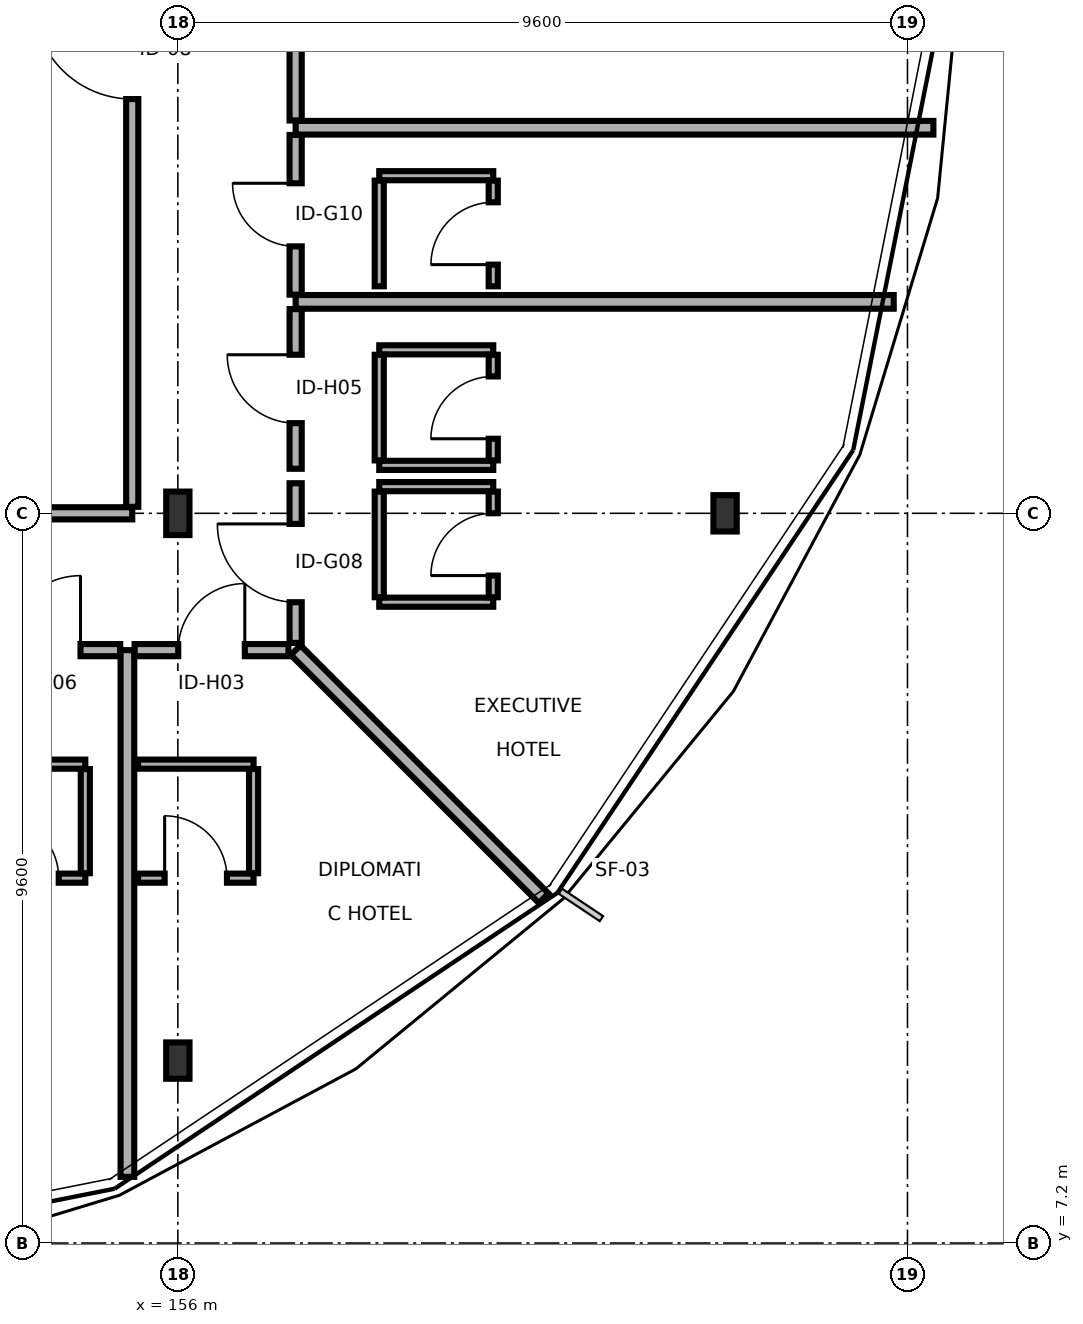
"""IFC4 building model, lengths in metres.
Left out: names, types, materials, properties, quantities, classifications, styles, units other than length and angle.
Written with IfcOpenShell. Run it as: python <this file> out.ifc"""

import sys

from ifc_helpers import new_model, si_unit, direction, frame, frame_2d, origin, origin_2d, place, context, subcontext, project, spatial, rectangle, i_section, extrude, element, fill, save


model = new_model("IFC4")
c1 = context("Model", 3, precision=1e-05, world=origin(), true_north=direction((0.0, 1.0)))
c2 = subcontext(c1, "Body", "Model", "MODEL_VIEW")
j1 = project(units=[si_unit("LENGTHUNIT", "METRE"), si_unit("PLANEANGLEUNIT", "RADIAN")], contexts=[c1])
p1 = place(None, origin())
s1 = spatial("IfcSite", under=j1, at=p1, CompositionType="ELEMENT")
p2 = place(p1, origin())
s2 = spatial("IfcBuilding", under=s1, at=p2, CompositionType="ELEMENT")
p3 = place(p2, frame((0.0, 0.0, 18.1)))
s3 = spatial("IfcBuildingStorey", under=s2, at=p3, CompositionType="ELEMENT", Elevation=18.1)
p4 = place(p3, frame((156.0, 16.8, 0.0), z_axis=(0.0, 0.0, 1.0), x_axis=(1.0, 0.0, 0.0)))
e1 = element("IfcColumn", 1, at=p4, inside=s3, PredefinedType="COLUMN", context=c2, shape_type="SweptSolid", body=[
    extrude(i_section(OverallWidth=0.306, OverallDepth=0.572, WebThickness=0.021, FlangeThickness=0.04, FilletRadius=0.027, at=origin_2d()), origin(), (0.0, 0.0, 1.0), 3.4),
])
for number, where, z_axis, x_axis in (
    (2, (156.0, 9.6, 0.0), (0.0, 0.0, 1.0), (1.0, 0.0, 0.0)),
    (3, (163.2, 16.8, 0.0), (0.0, 0.0, 1.0), (1.0, 0.0, 0.0)),
):
    element("IfcColumn", number, at=place(p3, frame(where, z_axis=z_axis, x_axis=x_axis)), inside=s3, PredefinedType="COLUMN", context=c2, shape_type="SweptSolid", body=[
        extrude(i_section(OverallWidth=0.307, OverallDepth=0.478, WebThickness=0.021, FlangeThickness=0.04, FilletRadius=0.027, at=origin_2d()), origin(), (0.0, 0.0, 1.0), 3.4),
    ])
p5 = place(p3, frame((153.6, 16.8, 0.0), z_axis=(0.0, 0.0, 1.0), x_axis=(1.0, 0.0, 0.0)))
e4 = element("IfcWall", 4, at=p5, inside=s3, PredefinedType="PARTITIONING", context=c2, shape_type="SweptSolid", body=[
    extrude(rectangle(XDim=1.8, YDim=0.16, at=frame_2d((0.9, 0.0))), origin(), (0.0, 0.0, 1.0), 2.745),
])
p6 = place(p3, frame((155.4, 16.885, 0.0), z_axis=(0.0, 0.0, 1.0), x_axis=(0.0, 1.0, 0.0)))
e5 = element("IfcWall", 5, at=p6, inside=s3, PredefinedType="PARTITIONING", context=c2, shape_type="SweptSolid", body=[
    extrude(rectangle(XDim=12.03, YDim=0.16, at=frame_2d((6.015, 0.0))), origin(), (0.0, 0.0, 1.0), 2.745),
])
p7 = place(p6, frame((5.365, 0.0, 0.0)))
e6 = element("IfcOpeningElement", 6, at=p7, cuts=e5, PredefinedType="OPENING", context=c2, shape_type="SweptSolid", body=[
    extrude(rectangle(XDim=1.3, YDim=2.2, at=frame_2d((0.65, 1.1))), frame((0.0, 0.09, 0.0), z_axis=(0.0, -1.0, 0.0), x_axis=(1.0, 0.0, 0.0)), (0.0, 0.0, 1.0), 0.18),
])
p8 = place(p3, frame((157.55, 21.968, 0.0), z_axis=(0.0, 0.0, 1.0), x_axis=(0.0, 1.0, 0.0)))
e7 = element("IfcWall", 7, at=p8, inside=s3, PredefinedType="PARTITIONING", context=c2, shape_type="SweptSolid", body=[
    extrude(rectangle(XDim=6.683, YDim=0.16, at=frame_2d((3.341, 0.0))), origin(), (0.0, 0.0, 1.0), 2.745),
])
p9 = place(p8, frame((2.591, 0.0, 0.0)))
e8 = element("IfcOpeningElement", 8, at=p9, cuts=e7, PredefinedType="OPENING", context=c2, shape_type="SweptSolid", body=[
    extrude(rectangle(XDim=1.5, YDim=2.25, at=frame_2d((0.75, 1.125))), frame((0.0, 0.09, 0.0), z_axis=(0.0, -1.0, 0.0), x_axis=(1.0, 0.0, 0.0)), (0.0, 0.0, 1.0), 0.18),
])
p10 = place(p3, frame((153.218, 15.0, 0.0), z_axis=(0.0, 0.0, 1.0), x_axis=(1.0, 0.0, 0.0)))
e9 = element("IfcWall", 9, at=p10, inside=s3, PredefinedType="PARTITIONING", context=c2, shape_type="SweptSolid", body=[
    extrude(rectangle(XDim=2.024, YDim=0.16, at=frame_2d((1.012, 0.0))), origin(), (0.0, 0.0, 1.0), 3.21),
])
p11 = place(p10, frame((0.522, 0.0, 0.0)))
e10 = element("IfcOpeningElement", 10, at=p11, cuts=e9, PredefinedType="OPENING", context=c2, shape_type="SweptSolid", body=[
    extrude(rectangle(XDim=0.98, YDim=2.05, at=frame_2d((0.49, 1.025))), frame((0.0, 0.09, 0.0), z_axis=(0.0, -1.0, 0.0), x_axis=(1.0, 0.0, 0.0)), (0.0, 0.0, 1.0), 0.18),
])
p12 = place(p3, frame((153.263, 12.0, 0.0), z_axis=(0.0, 0.0, 1.0), x_axis=(1.0, 0.0, 0.0)))
e11 = element("IfcWall", 11, at=p12, inside=s3, PredefinedType="PARTITIONING", context=c2, shape_type="SweptSolid", body=[
    extrude(rectangle(XDim=1.52, YDim=0.12, at=frame_2d((0.76, 0.0))), origin(), (0.0, 0.0, 1.0), 3.21),
])
p13 = place(p12, frame((0.35, 0.0, 0.0)))
e12 = element("IfcOpeningElement", 12, at=p13, cuts=e11, PredefinedType="OPENING", context=c2, shape_type="SweptSolid", body=[
    extrude(rectangle(XDim=0.82, YDim=2.08, at=frame_2d((0.41, 1.04))), frame((0.0, 0.07, 0.0), z_axis=(0.0, -1.0, 0.0), x_axis=(1.0, 0.0, 0.0)), (0.0, 0.0, 1.0), 0.14),
])
p14 = place(p3, frame((153.263, 13.5, 0.0), z_axis=(0.0, 0.0, 1.0), x_axis=(1.0, 0.0, 0.0)))
e13 = element("IfcWall", 13, at=p14, inside=s3, PredefinedType="PARTITIONING", context=c2, shape_type="SweptSolid", body=[
    extrude(rectangle(XDim=1.52, YDim=0.12, at=frame_2d((0.76, 0.0))), origin(), (0.0, 0.0, 1.0), 3.21),
])
p15 = place(p3, frame((154.783, 12.065, 0.0), z_axis=(0.0, 0.0, 1.0), x_axis=(0.0, 1.0, 0.0)))
e14 = element("IfcWall", 14, at=p15, inside=s3, PredefinedType="PARTITIONING", context=c2, shape_type="SweptSolid", body=[
    extrude(rectangle(XDim=1.37, YDim=0.12, at=frame_2d((0.685, 0.0))), origin(), (0.0, 0.0, 1.0), 3.21),
])
p16 = place(p3, frame((155.336, 8.071, 0.0), z_axis=(0.0, 0.0, 1.0), x_axis=(0.0, 1.0, 0.0)))
e15 = element("IfcWall", 15, at=p16, inside=s3, PredefinedType="PARTITIONING", context=c2, shape_type="SweptSolid", body=[
    extrude(rectangle(XDim=6.929, YDim=0.18, at=frame_2d((3.465, 0.0))), origin(), (0.0, 0.0, 1.0), 2.755),
])
p17 = place(p3, frame((155.431, 15.0, 0.0), z_axis=(0.0, 0.0, 1.0), x_axis=(1.0, 0.0, 0.0)))
e16 = element("IfcWall", 16, at=p17, inside=s3, PredefinedType="PARTITIONING", context=c2, shape_type="SweptSolid", body=[
    extrude(rectangle(XDim=2.024, YDim=0.16, at=frame_2d((1.012, 0.0))), origin(), (0.0, 0.0, 1.0), 2.745),
])
p18 = place(p17, frame((0.574, 0.0, 0.0)))
e17 = element("IfcOpeningElement", 17, at=p18, cuts=e16, PredefinedType="OPENING", context=c2, shape_type="SweptSolid", body=[
    extrude(rectangle(XDim=0.876, YDim=2.16, at=frame_2d((0.438, 1.08))), frame((0.0, 0.09, 0.0), z_axis=(0.0, -1.0, 0.0), x_axis=(1.0, 0.0, 0.0)), (0.0, 0.0, 1.0), 0.18),
])
p19 = place(p3, frame((155.476, 12.0, 0.0), z_axis=(0.0, 0.0, 1.0), x_axis=(1.0, 0.0, 0.0)))
e18 = element("IfcWall", 18, at=p19, inside=s3, PredefinedType="PARTITIONING", context=c2, shape_type="SweptSolid", body=[
    extrude(rectangle(XDim=1.52, YDim=0.12, at=frame_2d((0.76, 0.0))), origin(), (0.0, 0.0, 1.0), 2.745),
])
p20 = place(p19, frame((0.35, 0.0, 0.0)))
e19 = element("IfcOpeningElement", 19, at=p20, cuts=e18, PredefinedType="OPENING", context=c2, shape_type="SweptSolid", body=[
    extrude(rectangle(XDim=0.82, YDim=2.08, at=frame_2d((0.41, 1.04))), frame((0.0, 0.07, 0.0), z_axis=(0.0, -1.0, 0.0), x_axis=(1.0, 0.0, 0.0)), (0.0, 0.0, 1.0), 0.14),
])
p21 = place(p3, frame((155.476, 13.5, 0.0), z_axis=(0.0, 0.0, 1.0), x_axis=(1.0, 0.0, 0.0)))
e20 = element("IfcWall", 20, at=p21, inside=s3, PredefinedType="PARTITIONING", context=c2, shape_type="SweptSolid", body=[
    extrude(rectangle(XDim=1.52, YDim=0.12, at=frame_2d((0.76, 0.0))), origin(), (0.0, 0.0, 1.0), 2.745),
])
p22 = place(p3, frame((156.996, 12.065, 0.0), z_axis=(0.0, 0.0, 1.0), x_axis=(0.0, 1.0, 0.0)))
e21 = element("IfcWall", 21, at=p22, inside=s3, PredefinedType="PARTITIONING", context=c2, shape_type="SweptSolid", body=[
    extrude(rectangle(XDim=1.37, YDim=0.12, at=frame_2d((0.685, 0.0))), origin(), (0.0, 0.0, 1.0), 3.21),
])
p23 = place(p3, frame((157.55, 15.0, 0.0), z_axis=(0.0, 0.0, 1.0), x_axis=(0.707106781187, -0.707106781187, 0.0)))
e22 = element("IfcWall", 22, at=p23, inside=s3, PredefinedType="PARTITIONING", context=c2, shape_type="SweptSolid", body=[
    extrude(rectangle(XDim=4.615, YDim=0.18, at=frame_2d((2.308, 0.0))), origin(), (0.0, 0.0, 1.0), 2.755),
])
p24 = place(p3, frame((157.55, 15.095, 0.0), z_axis=(0.0, 0.0, 1.0), x_axis=(0.0, 1.0, 0.0)))
e23 = element("IfcWall", 23, at=p24, inside=s3, PredefinedType="PARTITIONING", context=c2, shape_type="SweptSolid", body=[
    extrude(rectangle(XDim=2.101, YDim=0.16, at=frame_2d((1.05, 0.0))), origin(), (0.0, 0.0, 1.0), 2.745),
])
p25 = place(p24, frame((0.535, 0.0, 0.0)))
e24 = element("IfcOpeningElement", 24, at=p25, cuts=e23, PredefinedType="OPENING", context=c2, shape_type="SweptSolid", body=[
    extrude(rectangle(XDim=1.03, YDim=2.05, at=frame_2d((0.515, 1.025))), frame((0.0, 0.09, 0.0), z_axis=(0.0, -1.0, 0.0), x_axis=(1.0, 0.0, 0.0)), (0.0, 0.0, 1.0), 0.18),
])
for number, where, z_axis, x_axis in (
    (25, (158.65, 15.631, 0.0), (0.0, 0.0, 1.0), (1.0, 0.0, 0.0)),
    (26, (158.65, 17.151, 0.0), (0.0, 0.0, 1.0), (1.0, 0.0, 0.0)),
):
    element("IfcWall", number, at=place(p3, frame(where, z_axis=z_axis, x_axis=x_axis)), inside=s3, PredefinedType="PARTITIONING", context=c2, shape_type="SweptSolid", body=[
        extrude(rectangle(XDim=1.5, YDim=0.12, at=frame_2d((0.75, 0.0))), origin(), (0.0, 0.0, 1.0), 3.21),
    ])
p26 = place(p3, frame((158.65, 15.696, 0.0), z_axis=(0.0, 0.0, 1.0), x_axis=(0.0, 1.0, 0.0)))
e27 = element("IfcWall", 27, at=p26, inside=s3, PredefinedType="PARTITIONING", context=c2, shape_type="SweptSolid", body=[
    extrude(rectangle(XDim=1.39, YDim=0.12, at=frame_2d((0.695, 0.0))), origin(), (0.0, 0.0, 1.0), 2.745),
])
p27 = place(p3, frame((160.15, 15.696, 0.0), z_axis=(0.0, 0.0, 1.0), x_axis=(0.0, 1.0, 0.0)))
e28 = element("IfcWall", 28, at=p27, inside=s3, PredefinedType="PARTITIONING", context=c2, shape_type="SweptSolid", body=[
    extrude(rectangle(XDim=1.39, YDim=0.12, at=frame_2d((0.695, 0.0))), origin(), (0.0, 0.0, 1.0), 2.745),
])
p28 = place(p27, frame((0.285, 0.0, 0.0)))
e29 = element("IfcOpeningElement", 29, at=p28, cuts=e28, PredefinedType="OPENING", context=c2, shape_type="SweptSolid", body=[
    extrude(rectangle(XDim=0.82, YDim=2.08, at=frame_2d((0.41, 1.04))), frame((0.0, 0.07, 0.0), z_axis=(0.0, -1.0, 0.0), x_axis=(1.0, 0.0, 0.0)), (0.0, 0.0, 1.0), 0.14),
])
p29 = place(p3, frame((157.55, 17.386, 0.0), z_axis=(0.0, 0.0, 1.0), x_axis=(0.0, 1.0, 0.0)))
e30 = element("IfcWall", 30, at=p29, inside=s3, PredefinedType="PARTITIONING", context=c2, shape_type="SweptSolid", body=[
    extrude(rectangle(XDim=2.101, YDim=0.16, at=frame_2d((1.05, 0.0))), origin(), (0.0, 0.0, 1.0), 3.21),
])
p30 = place(p29, frame((0.6, 0.0, 0.0)))
e31 = element("IfcOpeningElement", 31, at=p30, cuts=e30, PredefinedType="OPENING", context=c2, shape_type="SweptSolid", body=[
    extrude(rectangle(XDim=0.9, YDim=2.1, at=frame_2d((0.45, 1.05))), frame((0.0, 0.09, 0.0), z_axis=(0.0, -1.0, 0.0), x_axis=(1.0, 0.0, 0.0)), (0.0, 0.0, 1.0), 0.18),
])
for number, where, z_axis, x_axis in (
    (32, (158.65, 17.431, 0.0), (0.0, 0.0, 1.0), (1.0, 0.0, 0.0)),
    (33, (158.65, 18.951, 0.0), (0.0, 0.0, 1.0), (1.0, 0.0, 0.0)),
):
    element("IfcWall", number, at=place(p3, frame(where, z_axis=z_axis, x_axis=x_axis)), inside=s3, PredefinedType="PARTITIONING", context=c2, shape_type="SweptSolid", body=[
        extrude(rectangle(XDim=1.5, YDim=0.12, at=frame_2d((0.75, 0.0))), origin(), (0.0, 0.0, 1.0), 3.21),
    ])
p31 = place(p3, frame((158.65, 17.496, 0.0), z_axis=(0.0, 0.0, 1.0), x_axis=(0.0, 1.0, 0.0)))
e34 = element("IfcWall", 34, at=p31, inside=s3, PredefinedType="PARTITIONING", context=c2, shape_type="SweptSolid", body=[
    extrude(rectangle(XDim=1.39, YDim=0.12, at=frame_2d((0.695, 0.0))), origin(), (0.0, 0.0, 1.0), 3.21),
])
p32 = place(p3, frame((160.15, 17.496, 0.0), z_axis=(0.0, 0.0, 1.0), x_axis=(0.0, 1.0, 0.0)))
e35 = element("IfcWall", 35, at=p32, inside=s3, PredefinedType="PARTITIONING", context=c2, shape_type="SweptSolid", body=[
    extrude(rectangle(XDim=1.39, YDim=0.12, at=frame_2d((0.695, 0.0))), origin(), (0.0, 0.0, 1.0), 3.21),
])
p33 = place(p32, frame((0.285, 0.0, 0.0)))
e36 = element("IfcOpeningElement", 36, at=p33, cuts=e35, PredefinedType="OPENING", context=c2, shape_type="SweptSolid", body=[
    extrude(rectangle(XDim=0.82, YDim=2.08, at=frame_2d((0.41, 1.04))), frame((0.0, 0.07, 0.0), z_axis=(0.0, -1.0, 0.0), x_axis=(1.0, 0.0, 0.0)), (0.0, 0.0, 1.0), 0.14),
])
p34 = place(p3, frame((157.55, 19.582, 0.0), z_axis=(0.0, 0.0, 1.0), x_axis=(1.0, 0.0, 0.0)))
e37 = element("IfcWall", 37, at=p34, inside=s3, PredefinedType="PARTITIONING", context=c2, shape_type="SweptSolid", body=[
    extrude(rectangle(XDim=7.869, YDim=0.18, at=frame_2d((3.934, 0.0))), origin(), (0.0, 0.0, 1.0), 2.755),
])
p35 = place(p3, frame((157.55, 19.677, 0.0), z_axis=(0.0, 0.0, 1.0), x_axis=(0.0, 1.0, 0.0)))
e38 = element("IfcWall", 38, at=p35, inside=s3, PredefinedType="PARTITIONING", context=c2, shape_type="SweptSolid", body=[
    extrude(rectangle(XDim=2.101, YDim=0.16, at=frame_2d((1.05, 0.0))), origin(), (0.0, 0.0, 1.0), 3.21),
])
p36 = place(p35, frame((0.635, 0.0, 0.0)))
e39 = element("IfcOpeningElement", 39, at=p36, cuts=e38, PredefinedType="OPENING", context=c2, shape_type="SweptSolid", body=[
    extrude(rectangle(XDim=0.83, YDim=2.11, at=frame_2d((0.415, 1.055))), frame((0.0, 0.09, 0.0), z_axis=(0.0, -1.0, 0.0), x_axis=(1.0, 0.0, 0.0)), (0.0, 0.0, 1.0), 0.18),
])
p37 = place(p3, frame((158.65, 21.242, 0.0), z_axis=(0.0, 0.0, 1.0), x_axis=(1.0, 0.0, 0.0)))
e40 = element("IfcWall", 40, at=p37, inside=s3, PredefinedType="PARTITIONING", context=c2, shape_type="SweptSolid", body=[
    extrude(rectangle(XDim=1.5, YDim=0.12, at=frame_2d((0.75, 0.0))), origin(), (0.0, 0.0, 1.0), 3.21),
])
p38 = place(p3, frame((158.65, 19.787, 0.0), z_axis=(0.0, 0.0, 1.0), x_axis=(0.0, 1.0, 0.0)))
e41 = element("IfcWall", 41, at=p38, inside=s3, PredefinedType="PARTITIONING", context=c2, shape_type="SweptSolid", body=[
    extrude(rectangle(XDim=1.39, YDim=0.12, at=frame_2d((0.695, 0.0))), origin(), (0.0, 0.0, 1.0), 3.21),
])
p39 = place(p3, frame((160.15, 19.787, 0.0), z_axis=(0.0, 0.0, 1.0), x_axis=(0.0, 1.0, 0.0)))
e42 = element("IfcWall", 42, at=p39, inside=s3, PredefinedType="PARTITIONING", context=c2, shape_type="SweptSolid", body=[
    extrude(rectangle(XDim=1.39, YDim=0.12, at=frame_2d((0.695, 0.0))), origin(), (0.0, 0.0, 1.0), 3.21),
])
p40 = place(p39, frame((0.285, 0.0, 0.0)))
e43 = element("IfcOpeningElement", 43, at=p40, cuts=e42, PredefinedType="OPENING", context=c2, shape_type="SweptSolid", body=[
    extrude(rectangle(XDim=0.82, YDim=2.08, at=frame_2d((0.41, 1.04))), frame((0.0, 0.07, 0.0), z_axis=(0.0, -1.0, 0.0), x_axis=(1.0, 0.0, 0.0)), (0.0, 0.0, 1.0), 0.14),
])
p41 = place(p3, frame((157.55, 21.873, 0.0), z_axis=(0.0, 0.0, 1.0), x_axis=(1.0, 0.0, 0.0)))
e44 = element("IfcWall", 44, at=p41, inside=s3, PredefinedType="PARTITIONING", context=c2, shape_type="SweptSolid", body=[
    extrude(rectangle(XDim=8.391, YDim=0.18, at=frame_2d((4.195, 0.0))), origin(), (0.0, 0.0, 1.0), 2.755),
])
p42 = place(p7, origin())
e45 = element("IfcDoor", 45, at=p42, inside=s3, OperationType="SINGLE_SWING_RIGHT", PredefinedType="DOOR", context=c2, shape_type="SweptSolid", body=[
    extrude(rectangle(XDim=1.3, YDim=2.2, at=frame_2d((0.65, 1.1))), frame((0.0, 0.025, 0.0), z_axis=(0.0, -1.0, 0.0), x_axis=(1.0, 0.0, 0.0)), (0.0, 0.0, 1.0), 0.05),
])
fill(e6, e45)
p43 = place(p11, origin())
e46 = element("IfcDoor", 46, at=p43, inside=s3, OperationType="SINGLE_SWING_RIGHT", PredefinedType="DOOR", context=c2, shape_type="SweptSolid", body=[
    extrude(rectangle(XDim=0.98, YDim=2.05, at=frame_2d((0.49, 1.025))), frame((0.0, 0.025, 0.0), z_axis=(0.0, -1.0, 0.0), x_axis=(1.0, 0.0, 0.0)), (0.0, 0.0, 1.0), 0.05),
])
fill(e10, e46)
p44 = place(p13, origin())
e47 = element("IfcDoor", 47, at=p44, inside=s3, OperationType="SINGLE_SWING_LEFT", PredefinedType="DOOR", context=c2, shape_type="SweptSolid", body=[
    extrude(rectangle(XDim=0.82, YDim=2.08, at=frame_2d((0.41, 1.04))), frame((0.0, 0.025, 0.0), z_axis=(0.0, -1.0, 0.0), x_axis=(1.0, 0.0, 0.0)), (0.0, 0.0, 1.0), 0.05),
])
fill(e12, e47)
p45 = place(p18, origin())
e48 = element("IfcDoor", 48, at=p45, inside=s3, OperationType="SINGLE_SWING_RIGHT", PredefinedType="DOOR", context=c2, shape_type="SweptSolid", body=[
    extrude(rectangle(XDim=0.876, YDim=2.16, at=frame_2d((0.438, 1.08))), frame((0.0, 0.025, 0.0), z_axis=(0.0, -1.0, 0.0), x_axis=(1.0, 0.0, 0.0)), (0.0, 0.0, 1.0), 0.05),
])
fill(e17, e48)
p46 = place(p20, origin())
e49 = element("IfcDoor", 49, at=p46, inside=s3, OperationType="SINGLE_SWING_LEFT", PredefinedType="DOOR", context=c2, shape_type="SweptSolid", body=[
    extrude(rectangle(XDim=0.82, YDim=2.08, at=frame_2d((0.41, 1.04))), frame((0.0, 0.025, 0.0), z_axis=(0.0, -1.0, 0.0), x_axis=(1.0, 0.0, 0.0)), (0.0, 0.0, 1.0), 0.05),
])
fill(e19, e49)
p47 = place(p25, origin())
e50 = element("IfcDoor", 50, at=p47, inside=s3, OperationType="SINGLE_SWING_RIGHT", PredefinedType="DOOR", context=c2, shape_type="SweptSolid", body=[
    extrude(rectangle(XDim=1.03, YDim=2.05, at=frame_2d((0.515, 1.025))), frame((0.0, 0.025, 0.0), z_axis=(0.0, -1.0, 0.0), x_axis=(1.0, 0.0, 0.0)), (0.0, 0.0, 1.0), 0.05),
])
fill(e24, e50)
p48 = place(p28, origin())
e51 = element("IfcDoor", 51, at=p48, inside=s3, OperationType="SINGLE_SWING_LEFT", PredefinedType="DOOR", context=c2, shape_type="SweptSolid", body=[
    extrude(rectangle(XDim=0.82, YDim=2.08, at=frame_2d((0.41, 1.04))), frame((0.0, 0.025, 0.0), z_axis=(0.0, -1.0, 0.0), x_axis=(1.0, 0.0, 0.0)), (0.0, 0.0, 1.0), 0.05),
])
fill(e29, e51)
p49 = place(p30, origin())
e52 = element("IfcDoor", 52, at=p49, inside=s3, OperationType="SINGLE_SWING_RIGHT", PredefinedType="DOOR", context=c2, shape_type="SweptSolid", body=[
    extrude(rectangle(XDim=0.9, YDim=2.1, at=frame_2d((0.45, 1.05))), frame((0.0, 0.025, 0.0), z_axis=(0.0, -1.0, 0.0), x_axis=(1.0, 0.0, 0.0)), (0.0, 0.0, 1.0), 0.05),
])
fill(e31, e52)
p50 = place(p33, origin())
e53 = element("IfcDoor", 53, at=p50, inside=s3, OperationType="SINGLE_SWING_LEFT", PredefinedType="DOOR", context=c2, shape_type="SweptSolid", body=[
    extrude(rectangle(XDim=0.82, YDim=2.08, at=frame_2d((0.41, 1.04))), frame((0.0, 0.025, 0.0), z_axis=(0.0, -1.0, 0.0), x_axis=(1.0, 0.0, 0.0)), (0.0, 0.0, 1.0), 0.05),
])
fill(e36, e53)
p51 = place(p36, origin())
e54 = element("IfcDoor", 54, at=p51, inside=s3, OperationType="SINGLE_SWING_RIGHT", PredefinedType="DOOR", context=c2, shape_type="SweptSolid", body=[
    extrude(rectangle(XDim=0.83, YDim=2.11, at=frame_2d((0.415, 1.055))), frame((0.0, 0.025, 0.0), z_axis=(0.0, -1.0, 0.0), x_axis=(1.0, 0.0, 0.0)), (0.0, 0.0, 1.0), 0.05),
])
fill(e39, e54)
p52 = place(p40, origin())
e55 = element("IfcDoor", 55, at=p52, inside=s3, OperationType="SINGLE_SWING_LEFT", PredefinedType="DOOR", context=c2, shape_type="SweptSolid", body=[
    extrude(rectangle(XDim=0.82, YDim=2.08, at=frame_2d((0.41, 1.04))), frame((0.0, 0.025, 0.0), z_axis=(0.0, -1.0, 0.0), x_axis=(1.0, 0.0, 0.0)), (0.0, 0.0, 1.0), 0.05),
])
fill(e43, e55)
save(model, sys.argv[1])
